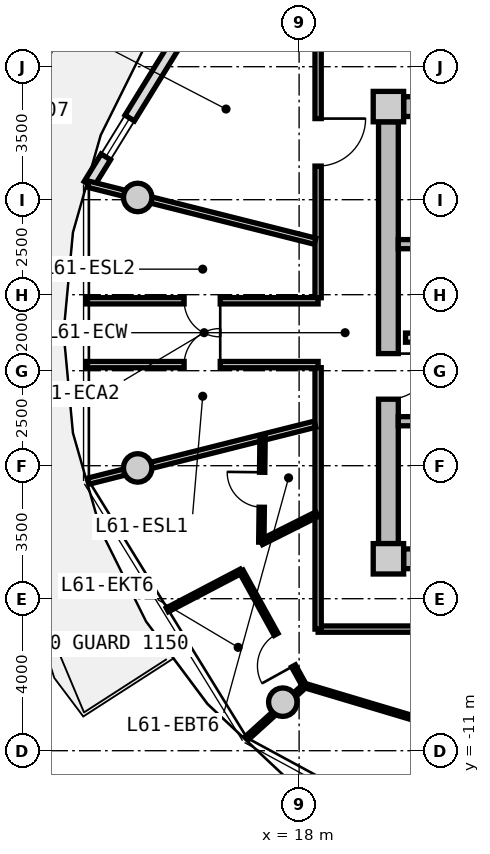
"""IFC4 building model, lengths in metres.
Left out: names, types, materials, properties, quantities, classifications, styles, units other than length and angle.
Written with IfcOpenShell. Run it as: python <this file> out.ifc"""

import sys

from ifc_helpers import new_model, si_unit, direction, frame, frame_2d, origin, origin_2d, place, context, subcontext, project, spatial, rectangle, circle, extrude, source, transform, mapped, element, fill, save


model = new_model("IFC4")
c1 = context("Model", 3, precision=1e-05, world=origin(), true_north=direction((0.0, 1.0)))
c2 = subcontext(c1, "Body", "Model", "MODEL_VIEW")
j1 = project(units=[si_unit("LENGTHUNIT", "METRE"), si_unit("PLANEANGLEUNIT", "RADIAN")], contexts=[c1])
p1 = place(None, origin())
s1 = spatial("IfcSite", under=j1, at=p1, CompositionType="ELEMENT")
p2 = place(p1, origin())
s2 = spatial("IfcBuilding", under=s1, at=p2, CompositionType="ELEMENT")
p3 = place(p2, frame((0.0, 0.0, 196.75)))
s3 = spatial("IfcBuildingStorey", under=s2, at=p3, CompositionType="ELEMENT", Elevation=196.75)
m1 = source(origin(), c2, "Body", "SweptSolid", [
    extrude(rectangle(XDim=0.8, YDim=0.8, at=origin_2d()), origin(), (0.0, 0.0, 1.0), 3.05),
])
for number, where, z_axis, x_axis in (
    (1, (20.35, -5.95, 0.0), (0.0, 0.0, 1.0), (1.0, 0.0, 0.0)),
    (2, (20.35, 5.95, 0.0), (0.0, 0.0, 1.0), (1.0, 0.0, 0.0)),
):
    element("IfcColumn", number, at=place(p3, frame(where, z_axis=z_axis, x_axis=x_axis)), inside=s3, PredefinedType="COLUMN", context=c2, shape_type="MappedRepresentation", body=[
        mapped(m1, transform((0.0, 0.0, 0.0), x_axis=(1.0, 0.0, 0.0), y_axis=(0.0, 1.0, 0.0), z_axis=(0.0, 0.0, 1.0), scale=1.0)),
    ])
m2 = source(origin(), c2, "Body", "SweptSolid", [
    extrude(rectangle(XDim=14.5, YDim=0.52, at=frame_2d((7.25, 0.0))), origin(), (0.0, 0.0, 1.0), 2.76),
])
for number, where, z_axis, x_axis in (
    (3, (20.75, 5.95, 0.0), (0.0, 0.0, 1.0), (1.0, 0.0, 0.0)),
    (4, (35.25, -5.95, 0.0), (0.0, 0.0, 1.0), (-1.0, 0.0, 0.0)),
):
    element("IfcWall", number, at=place(p3, frame(where, z_axis=z_axis, x_axis=x_axis)), inside=s3, PredefinedType="SHEAR", context=c2, shape_type="MappedRepresentation", body=[
        mapped(m2, transform((0.0, 0.0, 0.0), x_axis=(1.0, 0.0, 0.0), y_axis=(0.0, 1.0, 0.0), z_axis=(0.0, 0.0, 1.0), scale=1.0)),
    ])
m3 = source(origin(), c2, "Body", "SweptSolid", [
    extrude(rectangle(XDim=11.1, YDim=0.52, at=frame_2d((5.55, 0.0))), origin(), (0.0, 0.0, 1.0), 2.76),
])
p4 = place(p3, frame((20.35, -5.55, 0.0), z_axis=(0.0, 0.0, 1.0), x_axis=(0.0, 1.0, 0.0)))
e5 = element("IfcWall", 5, at=p4, inside=s3, PredefinedType="SHEAR", context=c2, shape_type="MappedRepresentation", body=[
    mapped(m3, transform((0.0, 0.0, 0.0), x_axis=(1.0, 0.0, 0.0), y_axis=(0.0, 1.0, 0.0), z_axis=(0.0, 0.0, 1.0), scale=1.0)),
])
p5 = place(p4, frame((3.8, 0.0, 0.0)))
e6 = element("IfcOpeningElement", 6, at=p5, cuts=e5, PredefinedType="OPENING", context=c2, shape_type="SweptSolid", body=[
    extrude(rectangle(XDim=1.2, YDim=2.15, at=frame_2d((0.6, 1.075))), frame((0.0, 0.27, 0.0), z_axis=(0.0, -1.0, 0.0), x_axis=(1.0, 0.0, 0.0)), (0.0, 0.0, 1.0), 0.54),
])
m4 = source(origin(), c2, "Body", "SweptSolid", [
    extrude(circle(Radius=0.375, at=origin_2d()), origin(), (0.0, 0.0, 1.0), 3.05),
])
for number, where, z_axis, x_axis in (
    (7, (13.753, 3.559, 0.0), (0.0, 0.0, 1.0), (1.0, 0.0, 0.0)),
    (8, (13.753, -3.559, 0.0), (0.0, 0.0, 1.0), (1.0, 0.0, 0.0)),
    (9, (17.57, -9.723, 0.0), (0.0, 0.0, 1.0), (1.0, 0.0, 0.0)),
):
    element("IfcColumn", number, at=place(p3, frame(where, z_axis=z_axis, x_axis=x_axis)), inside=s3, PredefinedType="COLUMN", context=c2, shape_type="MappedRepresentation", body=[
        mapped(m4, transform((0.0, 0.0, 0.0), x_axis=(1.0, 0.0, 0.0), y_axis=(0.0, 1.0, 0.0), z_axis=(0.0, 0.0, 1.0), scale=1.0)),
    ])
m5 = source(origin(), c2, "Body", "SweptSolid", [
    extrude(rectangle(XDim=7.938, YDim=0.29, at=frame_2d((3.969, 0.0))), origin(), (0.0, 0.0, 1.0), 2.76),
])
p6 = place(p3, frame((12.468, 3.903, 0.0), z_axis=(0.0, 0.0, 1.0), x_axis=(0.524244987663, 0.851567491694, 0.0)))
e10 = element("IfcWall", 10, at=p6, inside=s3, PredefinedType="SOLIDWALL", context=c2, shape_type="MappedRepresentation", body=[
    mapped(m5, transform((0.0, 0.0, 0.0), x_axis=(1.0, 0.0, 0.0), y_axis=(0.0, 1.0, 0.0), z_axis=(0.0, 0.0, 1.0), scale=1.0)),
])
p7 = place(p6, frame((5.94, 0.0, 0.0)))
e11 = element("IfcOpeningElement", 11, at=p7, cuts=e10, PredefinedType="OPENING", context=c2, shape_type="SweptSolid", body=[
    extrude(rectangle(XDim=1.15, YDim=2.25, at=frame_2d((0.575, 1.125))), frame((0.0, 0.155, 0.0), z_axis=(0.0, -1.0, 0.0), x_axis=(1.0, 0.0, 0.0)), (0.0, 0.0, 1.0), 0.31),
])
p8 = place(p6, frame((0.85, 0.0, 0.85)))
e12 = element("IfcOpeningElement", 12, at=p8, cuts=e10, PredefinedType="OPENING", context=c2, shape_type="SweptSolid", body=[
    extrude(rectangle(XDim=1.2, YDim=1.5, at=frame_2d((0.6, 0.75))), frame((0.0, 0.155, 0.0), z_axis=(0.0, -1.0, 0.0), x_axis=(1.0, 0.0, 0.0)), (0.0, 0.0, 1.0), 0.31),
])
m6 = source(origin(), c2, "Body", "SweptSolid", [
    extrude(rectangle(XDim=7.93, YDim=0.24, at=frame_2d((3.965, 0.0))), origin(), (0.0, 0.0, 1.0), 2.76),
])
p9 = place(p3, frame((20.61, 2.33, 0.0), z_axis=(0.0, 0.0, 1.0), x_axis=(1.0, 0.0, 0.0)))
e13 = element("IfcWall", 13, at=p9, inside=s3, PredefinedType="PARTITIONING", context=c2, shape_type="MappedRepresentation", body=[
    mapped(m6, transform((0.0, 0.0, 0.0), x_axis=(1.0, 0.0, 0.0), y_axis=(0.0, 1.0, 0.0), z_axis=(0.0, 0.0, 1.0), scale=1.0)),
])
p10 = place(p3, frame((20.61, -2.33, 0.0), z_axis=(0.0, 0.0, 1.0), x_axis=(1.0, 0.0, 0.0)))
e14 = element("IfcWall", 14, at=p10, inside=s3, PredefinedType="PARTITIONING", context=c2, shape_type="MappedRepresentation", body=[
    mapped(m6, transform((0.0, 0.0, 0.0), x_axis=(1.0, 0.0, 0.0), y_axis=(0.0, 1.0, 0.0), z_axis=(0.0, 0.0, 1.0), scale=1.0)),
])
p11 = place(p10, frame((1.05, 0.0, 0.0)))
e15 = element("IfcOpeningElement", 15, at=p11, cuts=e14, PredefinedType="OPENING", context=c2, shape_type="SweptSolid", body=[
    extrude(rectangle(XDim=1.1, YDim=2.15, at=frame_2d((0.55, 1.075))), frame((0.0, 0.13, 0.0), z_axis=(0.0, -1.0, 0.0), x_axis=(1.0, 0.0, 0.0)), (0.0, 0.0, 1.0), 0.26),
])
m7 = source(origin(), c2, "Body", "SweptSolid", [
    extrude(rectangle(XDim=7.62, YDim=0.24, at=frame_2d((3.81, 0.0))), origin(), (0.0, 0.0, 1.0), 2.745),
])
p12 = place(p3, frame((20.8, -0.13, 0.0), z_axis=(0.0, 0.0, 1.0), x_axis=(1.0, 0.0, 0.0)))
e16 = element("IfcWall", 16, at=p12, inside=s3, PredefinedType="PARTITIONING", context=c2, shape_type="MappedRepresentation", body=[
    mapped(m7, transform((0.0, 0.0, 0.0), x_axis=(1.0, 0.0, 0.0), y_axis=(0.0, 1.0, 0.0), z_axis=(0.0, 0.0, 1.0), scale=1.0)),
])
p13 = place(p12, frame((6.22, 0.0, 0.0)))
e17 = element("IfcOpeningElement", 17, at=p13, cuts=e16, PredefinedType="OPENING", context=c2, shape_type="SweptSolid", body=[
    extrude(rectangle(XDim=1.0, YDim=2.1, at=frame_2d((0.5, 1.05))), frame((0.0, 0.13, 0.0), z_axis=(0.0, -1.0, 0.0), x_axis=(1.0, 0.0, 0.0)), (0.0, 0.0, 1.0), 0.26),
])
p14 = place(p12, frame((2.4, 0.0, 0.0)))
e18 = element("IfcOpeningElement", 18, at=p14, cuts=e16, PredefinedType="OPENING", context=c2, shape_type="SweptSolid", body=[
    extrude(rectangle(XDim=1.0, YDim=2.1, at=frame_2d((0.5, 1.05))), frame((0.0, 0.13, 0.0), z_axis=(0.0, -1.0, 0.0), x_axis=(1.0, 0.0, 0.0)), (0.0, 0.0, 1.0), 0.26),
])
m8 = source(origin(), c2, "Body", "SweptSolid", [
    extrude(rectangle(XDim=19.0, YDim=0.165, at=frame_2d((9.5, 0.0))), origin(), (0.0, 0.0, 1.0), 2.745),
])
p15 = place(p3, frame((37.5, -7.8, 0.0), z_axis=(0.0, 0.0, 1.0), x_axis=(-1.0, 0.0, 0.0)))
e19 = element("IfcWall", 19, at=p15, inside=s3, PredefinedType="PARTITIONING", context=c2, shape_type="MappedRepresentation", body=[
    mapped(m8, transform((0.0, 0.0, 0.0), x_axis=(1.0, 0.0, 0.0), y_axis=(0.0, 1.0, 0.0), z_axis=(0.0, 0.0, 1.0), scale=1.0)),
])
p16 = place(p15, frame((9.392, 0.0, 0.0)))
e20 = element("IfcOpeningElement", 20, at=p16, cuts=e19, PredefinedType="OPENING", context=c2, shape_type="SweptSolid", body=[
    extrude(rectangle(XDim=1.05, YDim=2.15, at=frame_2d((0.525, 1.075))), frame((0.0, 0.093, 0.0), z_axis=(0.0, -1.0, 0.0), x_axis=(1.0, 0.0, 0.0)), (0.0, 0.0, 1.0), 0.185),
])
m9 = source(origin(), c2, "Body", "SweptSolid", [
    extrude(rectangle(XDim=6.88, YDim=0.165, at=frame_2d((3.44, 0.0))), origin(), (0.0, 0.0, 1.0), 2.745),
])
p17 = place(p3, frame((18.5, -7.8, 0.0), z_axis=(0.0, 0.0, 1.0), x_axis=(0.0, 1.0, 0.0)))
e21 = element("IfcWall", 21, at=p17, inside=s3, PredefinedType="PARTITIONING", context=c2, shape_type="MappedRepresentation", body=[
    mapped(m9, transform((0.0, 0.0, 0.0), x_axis=(1.0, 0.0, 0.0), y_axis=(0.0, 1.0, 0.0), z_axis=(0.0, 0.0, 1.0), scale=1.0)),
])
p18 = place(p3, frame((18.5, 0.92, 0.0), z_axis=(0.0, 0.0, 1.0), x_axis=(0.0, 1.0, 0.0)))
e22 = element("IfcWall", 22, at=p18, inside=s3, PredefinedType="PARTITIONING", context=c2, shape_type="MappedRepresentation", body=[
    mapped(m9, transform((0.0, 0.0, 0.0), x_axis=(1.0, 0.0, 0.0), y_axis=(0.0, 1.0, 0.0), z_axis=(0.0, 0.0, 1.0), scale=1.0)),
])
p19 = place(p18, frame((3.464, 0.0, 0.0)))
e23 = element("IfcOpeningElement", 23, at=p19, cuts=e22, PredefinedType="OPENING", context=c2, shape_type="SweptSolid", body=[
    extrude(rectangle(XDim=1.25, YDim=2.2, at=frame_2d((0.625, 1.1))), frame((0.0, 0.093, 0.0), z_axis=(0.0, -1.0, 0.0), x_axis=(1.0, 0.0, 0.0)), (0.0, 0.0, 1.0), 0.185),
])
m10 = source(origin(), c2, "Body", "SweptSolid", [
    extrude(rectangle(XDim=6.157, YDim=0.165, at=frame_2d((3.079, 0.0))), origin(), (0.0, 0.0, 1.0), 2.345),
])
for number, where, z_axis, x_axis in (
    (24, (18.42, 2.407, 0.0), (0.0, 0.0, 1.0), (-0.97, 0.244, 0.0)),
    (25, (18.42, -2.407, 0.0), (0.0, 0.0, 1.0), (-0.97, -0.244, 0.0)),
):
    element("IfcWall", number, at=place(p3, frame(where, z_axis=z_axis, x_axis=x_axis)), inside=s3, PredefinedType="PARTITIONING", context=c2, shape_type="MappedRepresentation", body=[
        mapped(m10, transform((0.0, 0.0, 0.0), x_axis=(1.0, 0.0, 0.0), y_axis=(0.0, 1.0, 0.0), z_axis=(0.0, 0.0, 1.0), scale=1.0)),
    ])
m11 = source(origin(), c2, "Body", "SweptSolid", [
    extrude(rectangle(XDim=6.101, YDim=0.165, at=frame_2d((3.051, 0.0))), origin(), (0.0, 0.0, 1.0), 2.745),
])
p20 = place(p3, frame((12.399, 0.84, 0.0), z_axis=(0.0, 0.0, 1.0), x_axis=(1.0, 0.0, 0.0)))
e26 = element("IfcWall", 26, at=p20, inside=s3, PredefinedType="PARTITIONING", context=c2, shape_type="MappedRepresentation", body=[
    mapped(m11, transform((0.0, 0.0, 0.0), x_axis=(1.0, 0.0, 0.0), y_axis=(0.0, 1.0, 0.0), z_axis=(0.0, 0.0, 1.0), scale=1.0)),
])
p21 = place(p20, frame((2.576, 0.0, 0.0)))
e27 = element("IfcOpeningElement", 27, at=p21, cuts=e26, PredefinedType="OPENING", context=c2, shape_type="SweptSolid", body=[
    extrude(rectangle(XDim=0.95, YDim=2.1, at=frame_2d((0.475, 1.05))), frame((0.0, 0.093, 0.0), z_axis=(0.0, -1.0, 0.0), x_axis=(1.0, 0.0, 0.0)), (0.0, 0.0, 1.0), 0.185),
])
p22 = place(p3, frame((18.5, -0.84, 0.0), z_axis=(0.0, 0.0, 1.0), x_axis=(-1.0, 0.0, 0.0)))
e28 = element("IfcWall", 28, at=p22, inside=s3, PredefinedType="PARTITIONING", context=c2, shape_type="MappedRepresentation", body=[
    mapped(m11, transform((0.0, 0.0, 0.0), x_axis=(1.0, 0.0, 0.0), y_axis=(0.0, 1.0, 0.0), z_axis=(0.0, 0.0, 1.0), scale=1.0)),
])
p23 = place(p22, frame((2.576, 0.0, 0.0)))
e29 = element("IfcOpeningElement", 29, at=p23, cuts=e28, PredefinedType="OPENING", context=c2, shape_type="SweptSolid", body=[
    extrude(rectangle(XDim=0.95, YDim=2.1, at=frame_2d((0.475, 1.05))), frame((0.0, 0.093, 0.0), z_axis=(0.0, -1.0, 0.0), x_axis=(1.0, 0.0, 0.0)), (0.0, 0.0, 1.0), 0.185),
])
m12 = source(origin(), c2, "Body", "SweptSolid", [
    extrude(rectangle(XDim=6.936, YDim=0.115, at=frame_2d((3.468, 0.0))), origin(), (0.0, 0.0, 1.0), 2.745),
])
p24 = place(p3, frame((18.151, -9.287, 0.0), z_axis=(0.0, 0.0, 1.0), x_axis=(0.958186895835, -0.286143098205, 0.0)))
e30 = element("IfcWall", 30, at=p24, inside=s3, PredefinedType="PARTITIONING", context=c2, shape_type="MappedRepresentation", body=[
    mapped(m12, transform((0.0, 0.0, 0.0), x_axis=(1.0, 0.0, 0.0), y_axis=(0.0, 1.0, 0.0), z_axis=(0.0, 0.0, 1.0), scale=1.0)),
])
p25 = place(p24, frame((2.993, 0.0, 0.0)))
e31 = element("IfcOpeningElement", 31, at=p25, cuts=e30, PredefinedType="OPENING", context=c2, shape_type="SweptSolid", body=[
    extrude(rectangle(XDim=0.95, YDim=2.1, at=frame_2d((0.475, 1.05))), frame((0.0, 0.067, 0.0), z_axis=(0.0, -1.0, 0.0), x_axis=(1.0, 0.0, 0.0)), (0.0, 0.0, 1.0), 0.135),
])
m13 = source(origin(), c2, "Body", "SweptSolid", [
    extrude(rectangle(XDim=2.072, YDim=0.115, at=frame_2d((1.036, 0.0))), origin(), (0.0, 0.0, 1.0), 2.345),
])
p26 = place(p3, frame((18.151, -9.287, 0.0), z_axis=(0.0, 0.0, 1.0), x_axis=(-0.741410125356, -0.671052178314, 0.0)))
e32 = element("IfcWall", 32, at=p26, inside=s3, PredefinedType="PARTITIONING", context=c2, shape_type="MappedRepresentation", body=[
    mapped(m13, transform((0.0, 0.0, 0.0), x_axis=(1.0, 0.0, 0.0), y_axis=(0.0, 1.0, 0.0), z_axis=(0.0, 0.0, 1.0), scale=1.0)),
])
m14 = source(origin(), c2, "Body", "SweptSolid", [
    extrude(rectangle(XDim=1.638, YDim=0.14, at=frame_2d((0.819, 0.0))), origin(), (0.0, 0.0, 1.0), 2.745),
])
p27 = place(p3, frame((18.47, -4.778, 0.0), z_axis=(0.0, 0.0, 1.0), x_axis=(-0.893919977945, -0.448226586707, 0.0)))
e33 = element("IfcWall", 33, at=p27, inside=s3, PredefinedType="PARTITIONING", context=c2, shape_type="MappedRepresentation", body=[
    mapped(m14, transform((0.0, 0.0, 0.0), x_axis=(1.0, 0.0, 0.0), y_axis=(0.0, 1.0, 0.0), z_axis=(0.0, 0.0, 1.0), scale=1.0)),
])
m15 = source(origin(), c2, "Body", "SweptSolid", [
    extrude(rectangle(XDim=2.759, YDim=0.14, at=frame_2d((1.379, 0.0))), origin(), (0.0, 0.0, 1.0), 2.745),
])
p28 = place(p3, frame((17.005, -5.513, 0.0), z_axis=(0.0, 0.0, 1.0), x_axis=(0.01194710728, 0.999928630767, 0.0)))
e34 = element("IfcWall", 34, at=p28, inside=s3, PredefinedType="PARTITIONING", context=c2, shape_type="MappedRepresentation", body=[
    mapped(m15, transform((0.0, 0.0, 0.0), x_axis=(1.0, 0.0, 0.0), y_axis=(0.0, 1.0, 0.0), z_axis=(0.0, 0.0, 1.0), scale=1.0)),
])
p29 = place(p28, frame((0.919, 0.0, 0.0)))
e35 = element("IfcOpeningElement", 35, at=p29, cuts=e34, PredefinedType="OPENING", context=c2, shape_type="SweptSolid", body=[
    extrude(rectangle(XDim=0.92, YDim=2.1, at=frame_2d((0.46, 1.05))), frame((0.0, 0.08, 0.0), z_axis=(0.0, -1.0, 0.0), x_axis=(1.0, 0.0, 0.0)), (0.0, 0.0, 1.0), 0.16),
])
m16 = source(origin(), c2, "Body", "SweptSolid", [
    extrude(rectangle(XDim=2.193, YDim=0.115, at=frame_2d((1.097, 0.0))), origin(), (0.0, 0.0, 1.0), 2.745),
])
p30 = place(p3, frame((16.475, -6.275, 0.0), z_axis=(0.0, 0.0, 1.0), x_axis=(-0.885783595046, -0.464098505435, 0.0)))
e36 = element("IfcWall", 36, at=p30, inside=s3, PredefinedType="PARTITIONING", context=c2, shape_type="MappedRepresentation", body=[
    mapped(m16, transform((0.0, 0.0, 0.0), x_axis=(1.0, 0.0, 0.0), y_axis=(0.0, 1.0, 0.0), z_axis=(0.0, 0.0, 1.0), scale=1.0)),
])
m17 = source(origin(), c2, "Body", "SweptSolid", [
    extrude(rectangle(XDim=3.45, YDim=0.115, at=frame_2d((1.725, 0.0))), origin(), (0.0, 0.0, 1.0), 2.745),
])
p31 = place(p3, frame((16.475, -6.275, 0.0), z_axis=(0.0, 0.0, 1.0), x_axis=(0.483659007882, -0.875256513312, 0.0)))
e37 = element("IfcWall", 37, at=p31, inside=s3, PredefinedType="PARTITIONING", context=c2, shape_type="MappedRepresentation", body=[
    mapped(m17, transform((0.0, 0.0, 0.0), x_axis=(1.0, 0.0, 0.0), y_axis=(0.0, 1.0, 0.0), z_axis=(0.0, 0.0, 1.0), scale=1.0)),
])
p32 = place(p31, frame((1.9, 0.0, 0.0)))
e38 = element("IfcOpeningElement", 38, at=p32, cuts=e37, PredefinedType="OPENING", context=c2, shape_type="SweptSolid", body=[
    extrude(rectangle(XDim=0.95, YDim=2.1, at=frame_2d((0.475, 1.05))), frame((0.0, 0.067, 0.0), z_axis=(0.0, -1.0, 0.0), x_axis=(1.0, 0.0, 0.0)), (0.0, 0.0, 1.0), 0.135),
])
m18 = source(origin(), c2, "Body", "SweptSolid", [
    extrude(rectangle(XDim=1.2, YDim=1.5, at=frame_2d((0.6, 0.75))), frame((0.0, 0.03, 0.0), z_axis=(0.0, -1.0, 0.0), x_axis=(1.0, 0.0, 0.0)), (0.0, 0.0, 1.0), 0.06),
])
p33 = place(p8, origin())
e39 = element("IfcWindow", 39, at=p33, inside=s3, PartitioningType="SINGLE_PANEL", PredefinedType="WINDOW", context=c2, shape_type="MappedRepresentation", body=[
    mapped(m18, transform((0.0, 0.0, 0.0), x_axis=(1.0, 0.0, 0.0), y_axis=(0.0, 1.0, 0.0), z_axis=(0.0, 0.0, 1.0), scale=1.0)),
])
fill(e12, e39)
m19 = source(origin(), c2, "Body", "SweptSolid", [
    extrude(rectangle(XDim=1.2, YDim=2.15, at=frame_2d((0.6, 1.075))), frame((0.0, 0.025, 0.0), z_axis=(0.0, -1.0, 0.0), x_axis=(1.0, 0.0, 0.0)), (0.0, 0.0, 1.0), 0.05),
])
p34 = place(p5, frame((1.2, 0.0, 0.0), z_axis=(0.0, 0.0, 1.0), x_axis=(-1.0, 0.0, 0.0)))
e40 = element("IfcDoor", 40, at=p34, inside=s3, OperationType="SINGLE_SWING_LEFT", PredefinedType="DOOR", context=c2, shape_type="MappedRepresentation", body=[
    mapped(m19, transform((0.0, 0.0, 0.0), x_axis=(1.0, 0.0, 0.0), y_axis=(0.0, 1.0, 0.0), z_axis=(0.0, 0.0, 1.0), scale=1.0)),
])
fill(e6, e40)
m20 = source(origin(), c2, "Body", "SweptSolid", [
    extrude(rectangle(XDim=0.95, YDim=2.1, at=frame_2d((0.475, 1.05))), frame((0.0, 0.025, 0.0), z_axis=(0.0, -1.0, 0.0), x_axis=(1.0, 0.0, 0.0)), (0.0, 0.0, 1.0), 0.05),
])
p35 = place(p23, frame((0.95, 0.0, 0.0), z_axis=(0.0, 0.0, 1.0), x_axis=(-1.0, 0.0, 0.0)))
e41 = element("IfcDoor", 41, at=p35, inside=s3, OperationType="SINGLE_SWING_RIGHT", PredefinedType="DOOR", context=c2, shape_type="MappedRepresentation", body=[
    mapped(m20, transform((0.0, 0.0, 0.0), x_axis=(1.0, 0.0, 0.0), y_axis=(0.0, 1.0, 0.0), z_axis=(0.0, 0.0, 1.0), scale=1.0)),
])
fill(e29, e41)
p36 = place(p21, frame((0.95, 0.0, 0.0), z_axis=(0.0, 0.0, 1.0), x_axis=(-1.0, 0.0, 0.0)))
e42 = element("IfcDoor", 42, at=p36, inside=s3, OperationType="SINGLE_SWING_LEFT", PredefinedType="DOOR", context=c2, shape_type="MappedRepresentation", body=[
    mapped(m20, transform((0.0, 0.0, 0.0), x_axis=(1.0, 0.0, 0.0), y_axis=(0.0, 1.0, 0.0), z_axis=(0.0, 0.0, 1.0), scale=1.0)),
])
fill(e27, e42)
m21 = source(origin(), c2, "Body", "SweptSolid", [
    extrude(rectangle(XDim=1.25, YDim=2.2, at=frame_2d((0.625, 1.1))), frame((0.0, 0.025, 0.0), z_axis=(0.0, -1.0, 0.0), x_axis=(1.0, 0.0, 0.0)), (0.0, 0.0, 1.0), 0.05),
])
p37 = place(p19, frame((1.25, 0.0, 0.0), z_axis=(0.0, 0.0, 1.0), x_axis=(-1.0, 0.0, 0.0)))
e43 = element("IfcDoor", 43, at=p37, inside=s3, OperationType="SINGLE_SWING_LEFT", PredefinedType="DOOR", context=c2, shape_type="MappedRepresentation", body=[
    mapped(m21, transform((0.0, 0.0, 0.0), x_axis=(1.0, 0.0, 0.0), y_axis=(0.0, 1.0, 0.0), z_axis=(0.0, 0.0, 1.0), scale=1.0)),
])
fill(e23, e43)
m22 = source(origin(), c2, "Body", "SweptSolid", [
    extrude(rectangle(XDim=0.92, YDim=2.1, at=frame_2d((0.46, 1.05))), frame((0.0, 0.025, 0.0), z_axis=(0.0, -1.0, 0.0), x_axis=(1.0, 0.0, 0.0)), (0.0, 0.0, 1.0), 0.05),
])
p38 = place(p29, origin())
e44 = element("IfcDoor", 44, at=p38, inside=s3, OperationType="SINGLE_SWING_RIGHT", PredefinedType="DOOR", context=c2, shape_type="MappedRepresentation", body=[
    mapped(m22, transform((0.0, 0.0, 0.0), x_axis=(1.0, 0.0, 0.0), y_axis=(0.0, 1.0, 0.0), z_axis=(0.0, 0.0, 1.0), scale=1.0)),
])
fill(e35, e44)
p39 = place(p32, frame((0.95, 0.0, 0.0), z_axis=(0.0, 0.0, 1.0), x_axis=(-1.0, 0.0, 0.0)))
e45 = element("IfcDoor", 45, at=p39, inside=s3, OperationType="SINGLE_SWING_LEFT", PredefinedType="DOOR", context=c2, shape_type="MappedRepresentation", body=[
    mapped(m20, transform((0.0, 0.0, 0.0), x_axis=(1.0, 0.0, 0.0), y_axis=(0.0, 1.0, 0.0), z_axis=(0.0, 0.0, 1.0), scale=1.0)),
])
fill(e38, e45)
save(model, sys.argv[1])
